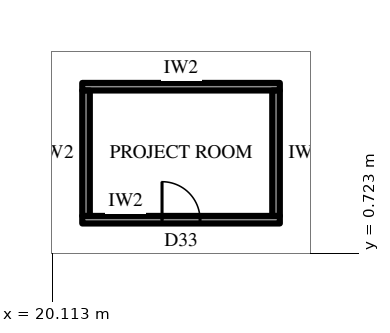
"""IFC4 building model, lengths in metres.
Left out: names, types, materials, properties, quantities, classifications, styles, units other than length and angle.
Written with IfcOpenShell. Run it as: python <this file> out.ifc"""

import sys

from ifc_helpers import new_model, si_unit, direction, frame, frame_2d, origin, place, context, subcontext, project, spatial, rectangle, extrude, element, fill, save


model = new_model("IFC4")
c1 = context("Model", 3, precision=1e-05, world=origin(), true_north=direction((0.0, 1.0)))
c2 = subcontext(c1, "Body", "Model", "MODEL_VIEW")
j1 = project(units=[si_unit("LENGTHUNIT", "METRE"), si_unit("PLANEANGLEUNIT", "RADIAN")], contexts=[c1])
p1 = place(None, origin())
s1 = spatial("IfcSite", under=j1, at=p1, CompositionType="ELEMENT")
p2 = place(p1, origin())
s2 = spatial("IfcBuilding", under=s1, at=p2, CompositionType="ELEMENT")
p3 = place(p2, frame((0.0, 0.0, 195.1)))
s3 = spatial("IfcBuildingStorey", under=s2, at=p3, CompositionType="ELEMENT", Elevation=195.1)
p4 = place(p3, frame((28.436, 4.747, 0.0), z_axis=(0.0, 0.0, 1.0), x_axis=(-0.499995666571, 0.866027905677, 0.0)))
e1 = element("IfcWall", 1, at=p4, inside=s3, PredefinedType="PARTITIONING", context=c2, shape_type="SweptSolid", body=[
    extrude(rectangle(XDim=20.215, YDim=0.2, at=frame_2d((10.107, 0.0))), origin(), (0.0, 0.0, 1.0), 4.0),
])
p5 = place(p4, frame((2.102, 0.0, 0.0)))
e2 = element("IfcOpeningElement", 2, at=p5, cuts=e1, PredefinedType="OPENING", context=c2, shape_type="SweptSolid", body=[
    extrude(rectangle(XDim=1.0, YDim=2.2, at=frame_2d((0.5, 1.1))), frame((0.0, 0.11, 0.0), z_axis=(0.0, -1.0, 0.0), x_axis=(1.0, 0.0, 0.0)), (0.0, 0.0, 1.0), 0.22),
])
p6 = place(p4, frame((7.105, 0.0, 0.0)))
e3 = element("IfcOpeningElement", 3, at=p6, cuts=e1, PredefinedType="OPENING", context=c2, shape_type="SweptSolid", body=[
    extrude(rectangle(XDim=1.0, YDim=2.2, at=frame_2d((0.5, 1.1))), frame((0.0, 0.11, 0.0), z_axis=(0.0, -1.0, 0.0), x_axis=(1.0, 0.0, 0.0)), (0.0, 0.0, 1.0), 0.22),
])
p7 = place(p4, frame((12.109, 0.0, 0.0)))
e4 = element("IfcOpeningElement", 4, at=p7, cuts=e1, PredefinedType="OPENING", context=c2, shape_type="SweptSolid", body=[
    extrude(rectangle(XDim=1.0, YDim=2.2, at=frame_2d((0.5, 1.1))), frame((0.0, 0.11, 0.0), z_axis=(0.0, -1.0, 0.0), x_axis=(1.0, 0.0, 0.0)), (0.0, 0.0, 1.0), 0.22),
])
p8 = place(p4, frame((17.113, 0.0, 0.0)))
e5 = element("IfcOpeningElement", 5, at=p8, cuts=e1, PredefinedType="OPENING", context=c2, shape_type="SweptSolid", body=[
    extrude(rectangle(XDim=1.0, YDim=2.2, at=frame_2d((0.5, 1.1))), frame((0.0, 0.11, 0.0), z_axis=(0.0, -1.0, 0.0), x_axis=(1.0, 0.0, 0.0)), (0.0, 0.0, 1.0), 0.22),
])
p9 = place(p3, frame((20.9, 1.6, 0.0), z_axis=(0.0, 0.0, 1.0), x_axis=(1.0, 0.0, 0.0)))
e6 = element("IfcWall", 6, at=p9, inside=s3, PredefinedType="PARTITIONING", context=c2, shape_type="SweptSolid", body=[
    extrude(rectangle(XDim=5.2, YDim=0.2, at=frame_2d((2.6, 0.0))), origin(), (0.0, 0.0, 1.0), 4.0),
])
p10 = place(p9, frame((2.1, 0.0, 0.0)))
e7 = element("IfcOpeningElement", 7, at=p10, cuts=e6, PredefinedType="OPENING", context=c2, shape_type="SweptSolid", body=[
    extrude(rectangle(XDim=1.0, YDim=2.2, at=frame_2d((0.5, 1.1))), frame((0.0, 0.11, 0.0), z_axis=(0.0, -1.0, 0.0), x_axis=(1.0, 0.0, 0.0)), (0.0, 0.0, 1.0), 0.22),
])
p11 = place(p3, frame((20.9, 5.1, 0.0), z_axis=(0.0, 0.0, 1.0), x_axis=(1.0, 0.0, 0.0)))
e8 = element("IfcWall", 8, at=p11, inside=s3, PredefinedType="PARTITIONING", context=c2, shape_type="SweptSolid", body=[
    extrude(rectangle(XDim=5.2, YDim=0.2, at=frame_2d((2.6, 0.0))), origin(), (0.0, 0.0, 1.0), 4.0),
])
for number, where, z_axis, x_axis in (
    (9, (21.0, 1.7, 0.0), (0.0, 0.0, 1.0), (0.0, 1.0, 0.0)),
    (10, (26.0, 1.7, 0.0), (0.0, 0.0, 1.0), (0.0, 1.0, 0.0)),
):
    element("IfcWall", number, at=place(p3, frame(where, z_axis=z_axis, x_axis=x_axis)), inside=s3, PredefinedType="PARTITIONING", context=c2, shape_type="SweptSolid", body=[
        extrude(rectangle(XDim=3.3, YDim=0.2, at=frame_2d((1.65, 0.0))), origin(), (0.0, 0.0, 1.0), 4.0),
    ])
p12 = place(p10, origin())
e11 = element("IfcDoor", 11, at=p12, inside=s3, OperationType="SINGLE_SWING_RIGHT", PredefinedType="DOOR", context=c2, shape_type="SweptSolid", body=[
    extrude(rectangle(XDim=1.0, YDim=2.2, at=frame_2d((0.5, 1.1))), frame((0.0, 0.025, 0.0), z_axis=(0.0, -1.0, 0.0), x_axis=(1.0, 0.0, 0.0)), (0.0, 0.0, 1.0), 0.05),
])
fill(e7, e11)
save(model, sys.argv[1])
